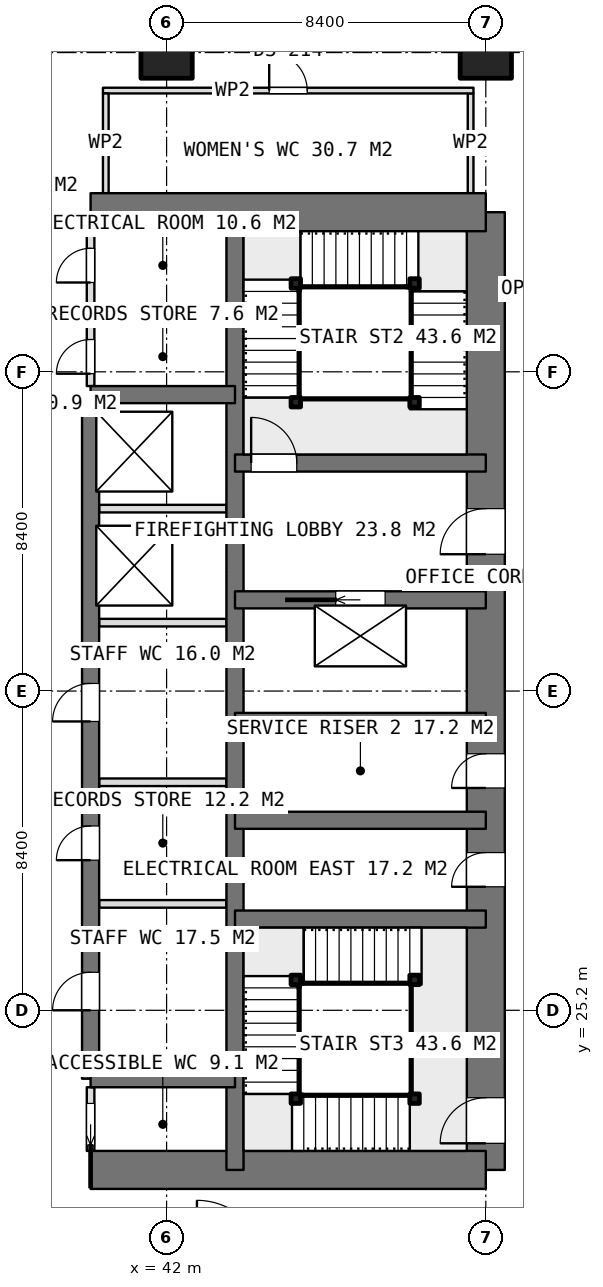
"""IFC4 building model, lengths in metres.
Left out: names, types, materials, properties, quantities, classifications, styles, units other than length and angle.
Written with IfcOpenShell. Run it as: python <this file> out.ifc"""

import sys

from ifc_helpers import new_model, si_unit, direction, frame, frame_2d, origin, origin_2d, place, context, subcontext, project, spatial, rectangle, extrude, element, fill, save


model = new_model("IFC4")
c1 = context("Model", 3, precision=1e-05, world=origin(), true_north=direction((0.0, 1.0)))
c2 = subcontext(c1, "Body", "Model", "MODEL_VIEW")
j1 = project(units=[si_unit("LENGTHUNIT", "METRE"), si_unit("PLANEANGLEUNIT", "RADIAN")], contexts=[c1])
p1 = place(None, origin())
s1 = spatial("IfcSite", under=j1, at=p1, CompositionType="ELEMENT")
p2 = place(p1, origin())
s2 = spatial("IfcBuilding", under=s1, at=p2, CompositionType="ELEMENT")
p3 = place(p2, frame((0.0, 0.0, 198.95)))
s3 = spatial("IfcBuildingStorey", under=s2, at=p3, CompositionType="ELEMENT", Elevation=198.95)
for number, where, z_axis, x_axis in (
    (1, (40.0, 21.0, 0.0), (0.0, 0.0, 1.0), (1.0, 0.0, 0.0)),
    (2, (40.0, 46.2, 0.0), (0.0, 0.0, 1.0), (1.0, 0.0, 0.0)),
):
    element("IfcWall", number, at=place(p3, frame(where, z_axis=z_axis, x_axis=x_axis)), inside=s3, PredefinedType="SHEAR", context=c2, shape_type="SweptSolid", body=[
        extrude(rectangle(XDim=10.4, YDim=1.0, at=frame_2d((5.2, 0.0))), origin(), (0.0, 0.0, 1.0), 3.75),
    ])
p4 = place(p3, frame((50.4, 21.0, 0.0), z_axis=(0.0, 0.0, 1.0), x_axis=(0.0, 1.0, 0.0)))
e3 = element("IfcWall", 3, at=p4, inside=s3, PredefinedType="SHEAR", context=c2, shape_type="SweptSolid", body=[
    extrude(rectangle(XDim=25.2, YDim=1.0, at=frame_2d((12.6, 0.0))), origin(), (0.0, 0.0, 1.0), 3.75),
])
p5 = place(p4, frame((16.2, 0.0, 0.0)))
e4 = element("IfcOpeningElement", 4, at=p5, cuts=e3, PredefinedType="OPENING", context=c2, shape_type="SweptSolid", body=[
    extrude(rectangle(XDim=1.2, YDim=2.1, at=frame_2d((0.6, 1.05))), frame((0.0, 0.51, 0.0), z_axis=(0.0, -1.0, 0.0), x_axis=(1.0, 0.0, 0.0)), (0.0, 0.0, 1.0), 1.02),
])
p6 = place(p4, frame((10.05, 0.0, 0.0)))
e5 = element("IfcOpeningElement", 5, at=p6, cuts=e3, PredefinedType="OPENING", context=c2, shape_type="SweptSolid", body=[
    extrude(rectangle(XDim=0.9, YDim=2.1, at=frame_2d((0.45, 1.05))), frame((0.0, 0.51, 0.0), z_axis=(0.0, -1.0, 0.0), x_axis=(1.0, 0.0, 0.0)), (0.0, 0.0, 1.0), 1.02),
])
p7 = place(p4, frame((7.45, 0.0, 0.0)))
e6 = element("IfcOpeningElement", 6, at=p7, cuts=e3, PredefinedType="OPENING", context=c2, shape_type="SweptSolid", body=[
    extrude(rectangle(XDim=0.9, YDim=2.1, at=frame_2d((0.45, 1.05))), frame((0.0, 0.51, 0.0), z_axis=(0.0, -1.0, 0.0), x_axis=(1.0, 0.0, 0.0)), (0.0, 0.0, 1.0), 1.02),
])
p8 = place(p4, frame((0.7, 0.0, 0.0)))
e7 = element("IfcOpeningElement", 7, at=p8, cuts=e3, PredefinedType="OPENING", context=c2, shape_type="SweptSolid", body=[
    extrude(rectangle(XDim=1.2, YDim=2.1, at=frame_2d((0.6, 1.05))), frame((0.0, 0.51, 0.0), z_axis=(0.0, -1.0, 0.0), x_axis=(1.0, 0.0, 0.0)), (0.0, 0.0, 1.0), 1.02),
])
p9 = place(p3, frame((43.8, 21.0, 0.0), z_axis=(0.0, 0.0, 1.0), x_axis=(0.0, 1.0, 0.0)))
e8 = element("IfcWall", 8, at=p9, inside=s3, PredefinedType="SHEAR", context=c2, shape_type="SweptSolid", body=[
    extrude(rectangle(XDim=25.2, YDim=0.45, at=frame_2d((12.6, 0.0))), origin(), (0.0, 0.0, 1.0), 3.75),
])
p10 = place(p3, frame((40.0, 23.4, 0.0), z_axis=(0.0, 0.0, 1.0), x_axis=(0.0, 1.0, 0.0)))
e9 = element("IfcWall", 9, at=p10, inside=s3, PredefinedType="SHEAR", context=c2, shape_type="SweptSolid", body=[
    extrude(rectangle(XDim=18.0, YDim=0.45, at=frame_2d((9.0, 0.0))), origin(), (0.0, 0.0, 1.0), 3.75),
])
p11 = place(p10, frame((1.8, 0.0, 0.0)))
e10 = element("IfcOpeningElement", 10, at=p11, cuts=e9, PredefinedType="OPENING", context=c2, shape_type="SweptSolid", body=[
    extrude(rectangle(XDim=1.0, YDim=2.1, at=frame_2d((0.5, 1.05))), frame((0.0, 0.235, 0.0), z_axis=(0.0, -1.0, 0.0), x_axis=(1.0, 0.0, 0.0)), (0.0, 0.0, 1.0), 0.47),
])
p12 = place(p10, frame((5.75, 0.0, 0.0)))
e11 = element("IfcOpeningElement", 11, at=p12, cuts=e9, PredefinedType="OPENING", context=c2, shape_type="SweptSolid", body=[
    extrude(rectangle(XDim=0.9, YDim=2.1, at=frame_2d((0.45, 1.05))), frame((0.0, 0.235, 0.0), z_axis=(0.0, -1.0, 0.0), x_axis=(1.0, 0.0, 0.0)), (0.0, 0.0, 1.0), 0.47),
])
p13 = place(p10, frame((9.4, 0.0, 0.0)))
e12 = element("IfcOpeningElement", 12, at=p13, cuts=e9, PredefinedType="OPENING", context=c2, shape_type="SweptSolid", body=[
    extrude(rectangle(XDim=1.0, YDim=2.1, at=frame_2d((0.5, 1.05))), frame((0.0, 0.235, 0.0), z_axis=(0.0, -1.0, 0.0), x_axis=(1.0, 0.0, 0.0)), (0.0, 0.0, 1.0), 0.47),
])
for number, where, z_axis, x_axis in (
    (13, (40.0, 23.4, 0.0), (0.0, 0.0, 1.0), (1.0, 0.0, 0.0)),
    (14, (40.0, 41.4, 0.0), (0.0, 0.0, 1.0), (1.0, 0.0, 0.0)),
):
    element("IfcWall", number, at=place(p3, frame(where, z_axis=z_axis, x_axis=x_axis)), inside=s3, PredefinedType="SHEAR", context=c2, shape_type="SweptSolid", body=[
        extrude(rectangle(XDim=3.8, YDim=0.45, at=frame_2d((1.9, 0.0))), origin(), (0.0, 0.0, 1.0), 3.75),
    ])
for number, where, z_axis, x_axis in (
    (15, (43.8, 27.6, 0.0), (0.0, 0.0, 1.0), (1.0, 0.0, 0.0)),
    (16, (43.8, 30.2, 0.0), (0.0, 0.0, 1.0), (1.0, 0.0, 0.0)),
    (17, (43.8, 32.8, 0.0), (0.0, 0.0, 1.0), (1.0, 0.0, 0.0)),
):
    element("IfcWall", number, at=place(p3, frame(where, z_axis=z_axis, x_axis=x_axis)), inside=s3, PredefinedType="SHEAR", context=c2, shape_type="SweptSolid", body=[
        extrude(rectangle(XDim=6.6, YDim=0.45, at=frame_2d((3.3, 0.0))), origin(), (0.0, 0.0, 1.0), 3.75),
    ])
p14 = place(p3, frame((43.8, 36.0, 0.0), z_axis=(0.0, 0.0, 1.0), x_axis=(1.0, 0.0, 0.0)))
e18 = element("IfcWall", 18, at=p14, inside=s3, PredefinedType="SHEAR", context=c2, shape_type="SweptSolid", body=[
    extrude(rectangle(XDim=6.6, YDim=0.45, at=frame_2d((3.3, 0.0))), origin(), (0.0, 0.0, 1.0), 3.75),
])
p15 = place(p14, frame((2.65, 0.0, 0.0)))
e19 = element("IfcOpeningElement", 19, at=p15, cuts=e18, PredefinedType="OPENING", context=c2, shape_type="SweptSolid", body=[
    extrude(rectangle(XDim=1.3, YDim=2.1, at=frame_2d((0.65, 1.05))), frame((0.0, 0.235, 0.0), z_axis=(0.0, -1.0, 0.0), x_axis=(1.0, 0.0, 0.0)), (0.0, 0.0, 1.0), 0.47),
])
p16 = place(p3, frame((43.8, 39.6, 0.0), z_axis=(0.0, 0.0, 1.0), x_axis=(1.0, 0.0, 0.0)))
e20 = element("IfcWall", 20, at=p16, inside=s3, PredefinedType="SHEAR", context=c2, shape_type="SweptSolid", body=[
    extrude(rectangle(XDim=6.6, YDim=0.45, at=frame_2d((3.3, 0.0))), origin(), (0.0, 0.0, 1.0), 3.75),
])
p17 = place(p16, frame((0.425, 0.0, 0.0)))
e21 = element("IfcOpeningElement", 21, at=p17, cuts=e20, PredefinedType="OPENING", context=c2, shape_type="SweptSolid", body=[
    extrude(rectangle(XDim=1.2, YDim=2.1, at=frame_2d((0.6, 1.05))), frame((0.0, 0.235, 0.0), z_axis=(0.0, -1.0, 0.0), x_axis=(1.0, 0.0, 0.0)), (0.0, 0.0, 1.0), 0.47),
])
for number, where, z_axis, x_axis in (
    (22, (42.0, 50.4, 0.0), (0.0, 0.0, 1.0), (1.0, 0.0, 0.0)),
    (23, (50.4, 50.4, 0.0), (0.0, 0.0, 1.0), (1.0, 0.0, 0.0)),
):
    element("IfcColumn", number, at=place(p3, frame(where, z_axis=z_axis, x_axis=x_axis)), inside=s3, PredefinedType="COLUMN", context=c2, shape_type="SweptSolid", body=[
        extrude(rectangle(XDim=1.35, YDim=1.35, at=origin_2d()), origin(), (0.0, 0.0, 1.0), 3.75),
    ])
for number, where, z_axis, x_axis in (
    (24, (40.225, 35.4, 0.0), (0.0, 0.0, 1.0), (1.0, 0.0, 0.0)),
    (25, (40.225, 38.4, 0.0), (0.0, 0.0, 1.0), (1.0, 0.0, 0.0)),
):
    element("IfcWall", number, at=place(p3, frame(where, z_axis=z_axis, x_axis=x_axis)), inside=s3, PredefinedType="PARTITIONING", context=c2, shape_type="SweptSolid", body=[
        extrude(rectangle(XDim=3.35, YDim=0.2, at=frame_2d((1.675, 0.0))), origin(), (0.0, 0.0, 1.0), 3.5),
    ])
p18 = place(p3, frame((40.0, 21.5, 0.0), z_axis=(0.0, 0.0, 1.0), x_axis=(0.0, 1.0, 0.0)))
e26 = element("IfcWall", 26, at=p18, inside=s3, PredefinedType="PARTITIONING", context=c2, shape_type="SweptSolid", body=[
    extrude(rectangle(XDim=1.675, YDim=0.2, at=frame_2d((0.837, 0.0))), origin(), (0.0, 0.0, 1.0), 3.5),
])
p19 = place(p18, frame((0.15, 0.0, 0.0)))
e27 = element("IfcOpeningElement", 27, at=p19, cuts=e26, PredefinedType="OPENING", context=c2, shape_type="SweptSolid", body=[
    extrude(rectangle(XDim=1.1, YDim=2.1, at=frame_2d((0.55, 1.05))), frame((0.0, 0.11, 0.0), z_axis=(0.0, -1.0, 0.0), x_axis=(1.0, 0.0, 0.0)), (0.0, 0.0, 1.0), 0.22),
])
p20 = place(p3, frame((40.0, 41.625, 0.0), z_axis=(0.0, 0.0, 1.0), x_axis=(0.0, 1.0, 0.0)))
e28 = element("IfcWall", 28, at=p20, inside=s3, PredefinedType="PARTITIONING", context=c2, shape_type="SweptSolid", body=[
    extrude(rectangle(XDim=4.075, YDim=0.2, at=frame_2d((2.038, 0.0))), origin(), (0.0, 0.0, 1.0), 3.5),
])
p21 = place(p20, frame((2.725, 0.0, 0.0)))
e29 = element("IfcOpeningElement", 29, at=p21, cuts=e28, PredefinedType="OPENING", context=c2, shape_type="SweptSolid", body=[
    extrude(rectangle(XDim=0.9, YDim=2.1, at=frame_2d((0.45, 1.05))), frame((0.0, 0.11, 0.0), z_axis=(0.0, -1.0, 0.0), x_axis=(1.0, 0.0, 0.0)), (0.0, 0.0, 1.0), 0.22),
])
p22 = place(p20, frame((0.325, 0.0, 0.0)))
e30 = element("IfcOpeningElement", 30, at=p22, cuts=e28, PredefinedType="OPENING", context=c2, shape_type="SweptSolid", body=[
    extrude(rectangle(XDim=0.9, YDim=2.1, at=frame_2d((0.45, 1.05))), frame((0.0, 0.11, 0.0), z_axis=(0.0, -1.0, 0.0), x_axis=(1.0, 0.0, 0.0)), (0.0, 0.0, 1.0), 0.22),
])
for number, where, z_axis, x_axis in (
    (31, (40.225, 28.0, 0.0), (0.0, 0.0, 1.0), (1.0, 0.0, 0.0)),
    (32, (40.225, 31.2, 0.0), (0.0, 0.0, 1.0), (1.0, 0.0, 0.0)),
):
    element("IfcWall", number, at=place(p3, frame(where, z_axis=z_axis, x_axis=x_axis)), inside=s3, PredefinedType="PARTITIONING", context=c2, shape_type="SweptSolid", body=[
        extrude(rectangle(XDim=3.35, YDim=0.2, at=frame_2d((1.675, 0.0))), origin(), (0.0, 0.0, 1.0), 3.5),
    ])
p23 = place(p3, frame((40.0, 43.4, 0.0), z_axis=(0.0, 0.0, 1.0), x_axis=(1.0, 0.0, 0.0)))
e33 = element("IfcWall", 33, at=p23, inside=s3, PredefinedType="PARTITIONING", context=c2, shape_type="SweptSolid", body=[
    extrude(rectangle(XDim=3.575, YDim=0.2, at=frame_2d((1.788, 0.0))), origin(), (0.0, 0.0, 1.0), 3.5),
])
p24 = place(p3, frame((40.325, 49.4, 0.0), z_axis=(0.0, 0.0, 1.0), x_axis=(1.0, 0.0, 0.0)))
e34 = element("IfcWall", 34, at=p24, inside=s3, PredefinedType="PARTITIONING", context=c2, shape_type="SweptSolid", body=[
    extrude(rectangle(XDim=9.75, YDim=0.15, at=frame_2d((4.875, 0.0))), origin(), (0.0, 0.0, 1.0), 3.5),
])
p25 = place(p24, frame((4.375, 0.0, 0.0)))
e35 = element("IfcOpeningElement", 35, at=p25, cuts=e34, PredefinedType="OPENING", context=c2, shape_type="SweptSolid", body=[
    extrude(rectangle(XDim=1.0, YDim=2.1, at=frame_2d((0.5, 1.05))), frame((0.0, 0.085, 0.0), z_axis=(0.0, -1.0, 0.0), x_axis=(1.0, 0.0, 0.0)), (0.0, 0.0, 1.0), 0.17),
])
for number, where, z_axis, x_axis in (
    (36, (40.4, 46.7, 0.0), (0.0, 0.0, 1.0), (0.0, 1.0, 0.0)),
    (37, (50.0, 46.7, 0.0), (0.0, 0.0, 1.0), (0.0, 1.0, 0.0)),
):
    element("IfcWall", number, at=place(p3, frame(where, z_axis=z_axis, x_axis=x_axis)), inside=s3, PredefinedType="PARTITIONING", context=c2, shape_type="SweptSolid", body=[
        extrude(rectangle(XDim=2.625, YDim=0.15, at=frame_2d((1.312, 0.0))), origin(), (0.0, 0.0, 1.0), 3.5),
    ])
for number, where, z_axis, x_axis in (
    (38, (45.4, 41.2, 0.0), (0.0, 0.0, 1.0), (1.0, 0.0, 0.0)),
    (39, (45.4, 44.325, 0.0), (0.0, 0.0, 1.0), (1.0, 0.0, 0.0)),
    (40, (48.525, 44.325, 0.0), (0.0, 0.0, 1.0), (1.0, 0.0, 0.0)),
    (41, (48.525, 41.2, 0.0), (0.0, 0.0, 1.0), (1.0, 0.0, 0.0)),
    (42, (48.525, 22.875, 0.0), (0.0, 0.0, 1.0), (1.0, 0.0, 0.0)),
    (43, (45.4, 22.875, 0.0), (0.0, 0.0, 1.0), (1.0, 0.0, 0.0)),
    (44, (45.4, 26.0, 0.0), (0.0, 0.0, 1.0), (1.0, 0.0, 0.0)),
    (45, (48.525, 26.0, 0.0), (0.0, 0.0, 1.0), (1.0, 0.0, 0.0)),
):
    element("IfcColumn", number, at=place(p3, frame(where, z_axis=z_axis, x_axis=x_axis)), inside=s3, PredefinedType="COLUMN", context=c2, shape_type="SweptSolid", body=[
        extrude(rectangle(XDim=0.25, YDim=0.25, at=origin_2d()), origin(), (0.0, 0.0, 1.0), 3.75),
    ])
p26 = place(p5, origin())
e46 = element("IfcDoor", 46, at=p26, inside=s3, OperationType="SINGLE_SWING_LEFT", PredefinedType="DOOR", context=c2, shape_type="SweptSolid", body=[
    extrude(rectangle(XDim=1.2, YDim=2.1, at=frame_2d((0.6, 1.05))), frame((0.0, 0.025, 0.0), z_axis=(0.0, -1.0, 0.0), x_axis=(1.0, 0.0, 0.0)), (0.0, 0.0, 1.0), 0.05),
])
fill(e4, e46)
p27 = place(p6, origin())
e47 = element("IfcDoor", 47, at=p27, inside=s3, OperationType="SINGLE_SWING_LEFT", PredefinedType="DOOR", context=c2, shape_type="SweptSolid", body=[
    extrude(rectangle(XDim=0.9, YDim=2.1, at=frame_2d((0.45, 1.05))), frame((0.0, 0.025, 0.0), z_axis=(0.0, -1.0, 0.0), x_axis=(1.0, 0.0, 0.0)), (0.0, 0.0, 1.0), 0.05),
])
fill(e5, e47)
p28 = place(p7, origin())
e48 = element("IfcDoor", 48, at=p28, inside=s3, OperationType="SINGLE_SWING_LEFT", PredefinedType="DOOR", context=c2, shape_type="SweptSolid", body=[
    extrude(rectangle(XDim=0.9, YDim=2.1, at=frame_2d((0.45, 1.05))), frame((0.0, 0.025, 0.0), z_axis=(0.0, -1.0, 0.0), x_axis=(1.0, 0.0, 0.0)), (0.0, 0.0, 1.0), 0.05),
])
fill(e6, e48)
p29 = place(p19, origin())
e49 = element("IfcDoor", 49, at=p29, inside=s3, OperationType="SLIDING_TO_LEFT", PredefinedType="DOOR", context=c2, shape_type="SweptSolid", body=[
    extrude(rectangle(XDim=1.1, YDim=2.1, at=frame_2d((0.55, 1.05))), frame((0.0, 0.025, 0.0), z_axis=(0.0, -1.0, 0.0), x_axis=(1.0, 0.0, 0.0)), (0.0, 0.0, 1.0), 0.05),
])
fill(e27, e49)
p30 = place(p21, origin())
e50 = element("IfcDoor", 50, at=p30, inside=s3, OperationType="SINGLE_SWING_LEFT", PredefinedType="DOOR", context=c2, shape_type="SweptSolid", body=[
    extrude(rectangle(XDim=0.9, YDim=2.1, at=frame_2d((0.45, 1.05))), frame((0.0, 0.025, 0.0), z_axis=(0.0, -1.0, 0.0), x_axis=(1.0, 0.0, 0.0)), (0.0, 0.0, 1.0), 0.05),
])
fill(e29, e50)
p31 = place(p22, origin())
e51 = element("IfcDoor", 51, at=p31, inside=s3, OperationType="SINGLE_SWING_LEFT", PredefinedType="DOOR", context=c2, shape_type="SweptSolid", body=[
    extrude(rectangle(XDim=0.9, YDim=2.1, at=frame_2d((0.45, 1.05))), frame((0.0, 0.025, 0.0), z_axis=(0.0, -1.0, 0.0), x_axis=(1.0, 0.0, 0.0)), (0.0, 0.0, 1.0), 0.05),
])
fill(e30, e51)
p32 = place(p11, origin())
e52 = element("IfcDoor", 52, at=p32, inside=s3, OperationType="SINGLE_SWING_LEFT", PredefinedType="DOOR", context=c2, shape_type="SweptSolid", body=[
    extrude(rectangle(XDim=1.0, YDim=2.1, at=frame_2d((0.5, 1.05))), frame((0.0, 0.025, 0.0), z_axis=(0.0, -1.0, 0.0), x_axis=(1.0, 0.0, 0.0)), (0.0, 0.0, 1.0), 0.05),
])
fill(e10, e52)
p33 = place(p12, origin())
e53 = element("IfcDoor", 53, at=p33, inside=s3, OperationType="SINGLE_SWING_LEFT", PredefinedType="DOOR", context=c2, shape_type="SweptSolid", body=[
    extrude(rectangle(XDim=0.9, YDim=2.1, at=frame_2d((0.45, 1.05))), frame((0.0, 0.025, 0.0), z_axis=(0.0, -1.0, 0.0), x_axis=(1.0, 0.0, 0.0)), (0.0, 0.0, 1.0), 0.05),
])
fill(e11, e53)
p34 = place(p13, origin())
e54 = element("IfcDoor", 54, at=p34, inside=s3, OperationType="SINGLE_SWING_LEFT", PredefinedType="DOOR", context=c2, shape_type="SweptSolid", body=[
    extrude(rectangle(XDim=1.0, YDim=2.1, at=frame_2d((0.5, 1.05))), frame((0.0, 0.025, 0.0), z_axis=(0.0, -1.0, 0.0), x_axis=(1.0, 0.0, 0.0)), (0.0, 0.0, 1.0), 0.05),
])
fill(e12, e54)
p35 = place(p15, origin())
e55 = element("IfcDoor", 55, at=p35, inside=s3, OperationType="SLIDING_TO_LEFT", PredefinedType="USERDEFINED", context=c2, shape_type="SweptSolid", body=[
    extrude(rectangle(XDim=1.3, YDim=2.1, at=frame_2d((0.65, 1.05))), frame((0.0, 0.025, 0.0), z_axis=(0.0, -1.0, 0.0), x_axis=(1.0, 0.0, 0.0)), (0.0, 0.0, 1.0), 0.05),
])
fill(e19, e55)
p36 = place(p25, origin())
e56 = element("IfcDoor", 56, at=p36, inside=s3, OperationType="SINGLE_SWING_LEFT", PredefinedType="DOOR", context=c2, shape_type="SweptSolid", body=[
    extrude(rectangle(XDim=1.0, YDim=2.1, at=frame_2d((0.5, 1.05))), frame((0.0, 0.025, 0.0), z_axis=(0.0, -1.0, 0.0), x_axis=(1.0, 0.0, 0.0)), (0.0, 0.0, 1.0), 0.05),
])
fill(e35, e56)
p37 = place(p17, origin())
e57 = element("IfcDoor", 57, at=p37, inside=s3, OperationType="SINGLE_SWING_RIGHT", PredefinedType="DOOR", context=c2, shape_type="SweptSolid", body=[
    extrude(rectangle(XDim=1.2, YDim=2.1, at=frame_2d((0.6, 1.05))), frame((0.0, 0.025, 0.0), z_axis=(0.0, -1.0, 0.0), x_axis=(1.0, 0.0, 0.0)), (0.0, 0.0, 1.0), 0.05),
])
fill(e21, e57)
p38 = place(p8, origin())
e58 = element("IfcDoor", 58, at=p38, inside=s3, OperationType="SINGLE_SWING_RIGHT", PredefinedType="DOOR", context=c2, shape_type="SweptSolid", body=[
    extrude(rectangle(XDim=1.2, YDim=2.1, at=frame_2d((0.6, 1.05))), frame((0.0, 0.025, 0.0), z_axis=(0.0, -1.0, 0.0), x_axis=(1.0, 0.0, 0.0)), (0.0, 0.0, 1.0), 0.05),
])
fill(e7, e58)
save(model, sys.argv[1])
